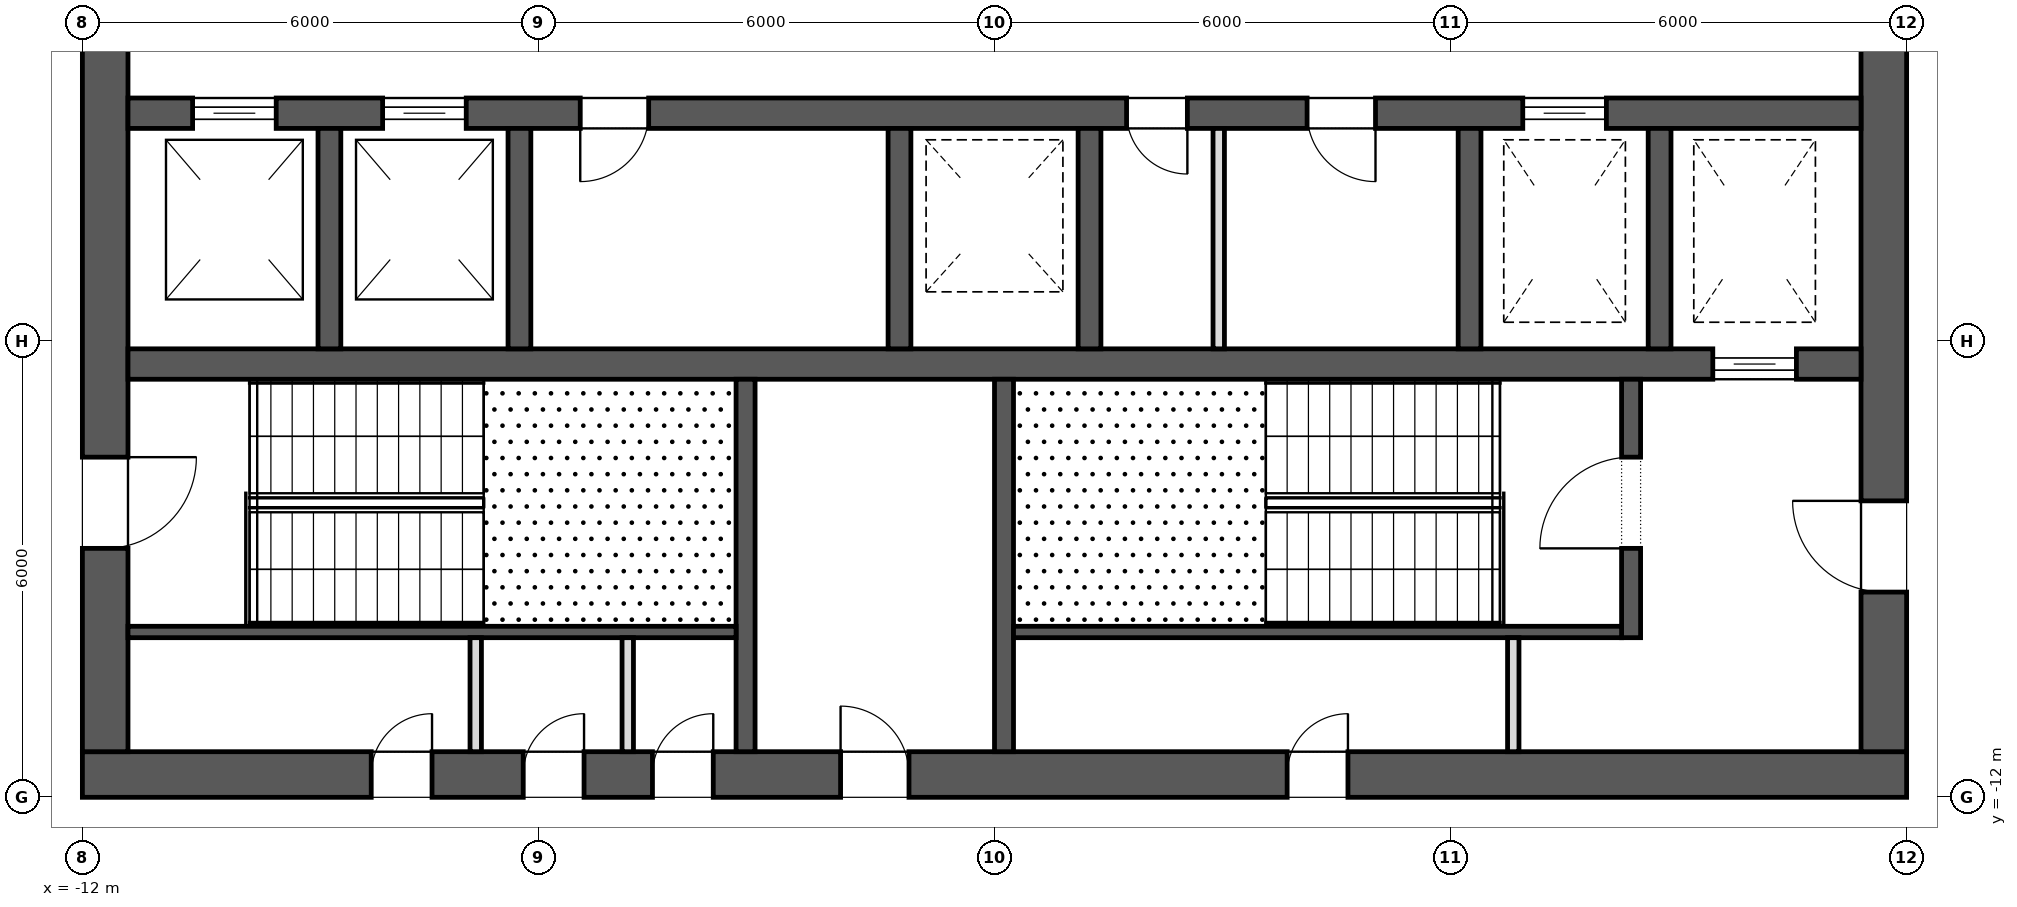
"""IFC4 building model, lengths in metres.
Left out: names, types, materials, properties, quantities, classifications, styles, units other than length and angle.
Written with IfcOpenShell. Run it as: python <this file> out.ifc"""

import sys

from ifc_helpers import new_model, si_unit, direction, frame, frame_2d, origin, place, context, subcontext, project, spatial, rectangle, extrude, element, fill, save


model = new_model("IFC4")
c1 = context("Model", 3, precision=1e-05, world=origin(), true_north=direction((0.0, 1.0)))
c2 = subcontext(c1, "Body", "Model", "MODEL_VIEW")
j1 = project(units=[si_unit("LENGTHUNIT", "METRE"), si_unit("PLANEANGLEUNIT", "RADIAN")], contexts=[c1])
p1 = place(None, origin())
s1 = spatial("IfcSite", under=j1, at=p1, CompositionType="ELEMENT")
p2 = place(p1, origin())
s2 = spatial("IfcBuilding", under=s1, at=p2, CompositionType="ELEMENT")
p3 = place(p2, frame((0.0, 0.0, 264.3)))
s3 = spatial("IfcBuildingStorey", under=s2, at=p3, CompositionType="ELEMENT", Elevation=264.3)
p4 = place(p3, frame((-12.0, -11.7, 0.0), z_axis=(0.0, 0.0, 1.0), x_axis=(1.0, 0.0, 0.0)))
e1 = element("IfcWall", 1, at=p4, inside=s3, PredefinedType="SHEAR", context=c2, shape_type="SweptSolid", body=[
    extrude(rectangle(XDim=24.0, YDim=0.6, at=frame_2d((12.0, 0.0))), origin(), (0.0, 0.0, 1.0), 4.0),
])
p5 = place(p4, frame((9.975, 0.0, 0.0)))
e2 = element("IfcOpeningElement", 2, at=p5, cuts=e1, PredefinedType="OPENING", context=c2, shape_type="SweptSolid", body=[
    extrude(rectangle(XDim=0.9, YDim=2.1, at=frame_2d((0.45, 1.05))), frame((0.0, 0.312, 0.0), z_axis=(0.0, -1.0, 0.0), x_axis=(1.0, 0.0, 0.0)), (0.0, 0.0, 1.0), 0.624),
])
p6 = place(p4, frame((3.8, 0.0, 0.0)))
e3 = element("IfcOpeningElement", 3, at=p6, cuts=e1, PredefinedType="OPENING", context=c2, shape_type="SweptSolid", body=[
    extrude(rectangle(XDim=0.8, YDim=2.1, at=frame_2d((0.4, 1.05))), frame((0.0, 0.312, 0.0), z_axis=(0.0, -1.0, 0.0), x_axis=(1.0, 0.0, 0.0)), (0.0, 0.0, 1.0), 0.624),
])
p7 = place(p4, frame((5.8, 0.0, 0.0)))
e4 = element("IfcOpeningElement", 4, at=p7, cuts=e1, PredefinedType="OPENING", context=c2, shape_type="SweptSolid", body=[
    extrude(rectangle(XDim=0.8, YDim=2.1, at=frame_2d((0.4, 1.05))), frame((0.0, 0.312, 0.0), z_axis=(0.0, -1.0, 0.0), x_axis=(1.0, 0.0, 0.0)), (0.0, 0.0, 1.0), 0.624),
])
p8 = place(p4, frame((7.5, 0.0, 0.0)))
e5 = element("IfcOpeningElement", 5, at=p8, cuts=e1, PredefinedType="OPENING", context=c2, shape_type="SweptSolid", body=[
    extrude(rectangle(XDim=0.8, YDim=2.1, at=frame_2d((0.4, 1.05))), frame((0.0, 0.312, 0.0), z_axis=(0.0, -1.0, 0.0), x_axis=(1.0, 0.0, 0.0)), (0.0, 0.0, 1.0), 0.624),
])
p9 = place(p4, frame((15.85, 0.0, 0.0)))
e6 = element("IfcOpeningElement", 6, at=p9, cuts=e1, PredefinedType="OPENING", context=c2, shape_type="SweptSolid", body=[
    extrude(rectangle(XDim=0.8, YDim=2.1, at=frame_2d((0.4, 1.05))), frame((0.0, 0.312, 0.0), z_axis=(0.0, -1.0, 0.0), x_axis=(1.0, 0.0, 0.0)), (0.0, 0.0, 1.0), 0.624),
])
p10 = place(p3, frame((11.7, -11.4, 0.0), z_axis=(0.0, 0.0, 1.0), x_axis=(0.0, 1.0, 0.0)))
e7 = element("IfcWall", 7, at=p10, inside=s3, PredefinedType="SHEAR", context=c2, shape_type="SweptSolid", body=[
    extrude(rectangle(XDim=22.8, YDim=0.6, at=frame_2d((11.4, 0.0))), origin(), (0.0, 0.0, 1.0), 4.0),
])
p11 = place(p10, frame((10.2, 0.0, 0.0)))
e8 = element("IfcOpeningElement", 8, at=p11, cuts=e7, PredefinedType="OPENING", context=c2, shape_type="SweptSolid", body=[
    extrude(rectangle(XDim=2.4, YDim=2.1, at=frame_2d((1.2, 1.05))), frame((0.0, 0.312, 0.0), z_axis=(0.0, -1.0, 0.0), x_axis=(1.0, 0.0, 0.0)), (0.0, 0.0, 1.0), 0.624),
])
p12 = place(p10, frame((19.5, 0.0, 0.0)))
e9 = element("IfcOpeningElement", 9, at=p12, cuts=e7, PredefinedType="OPENING", context=c2, shape_type="SweptSolid", body=[
    extrude(rectangle(XDim=1.2, YDim=2.1, at=frame_2d((0.6, 1.05))), frame((0.0, 0.312, 0.0), z_axis=(0.0, -1.0, 0.0), x_axis=(1.0, 0.0, 0.0)), (0.0, 0.0, 1.0), 0.624),
])
p13 = place(p10, frame((2.1, 0.0, 0.0)))
e10 = element("IfcOpeningElement", 10, at=p13, cuts=e7, PredefinedType="OPENING", context=c2, shape_type="SweptSolid", body=[
    extrude(rectangle(XDim=1.2, YDim=2.1, at=frame_2d((0.6, 1.05))), frame((0.0, 0.312, 0.0), z_axis=(0.0, -1.0, 0.0), x_axis=(1.0, 0.0, 0.0)), (0.0, 0.0, 1.0), 0.624),
])
p14 = place(p3, frame((-11.7, -11.4, 0.0), z_axis=(0.0, 0.0, 1.0), x_axis=(0.0, 1.0, 0.0)))
e11 = element("IfcWall", 11, at=p14, inside=s3, PredefinedType="SHEAR", context=c2, shape_type="SweptSolid", body=[
    extrude(rectangle(XDim=22.8, YDim=0.6, at=frame_2d((11.4, 0.0))), origin(), (0.0, 0.0, 1.0), 4.0),
])
p15 = place(p14, frame((10.2, 0.0, 0.0)))
e12 = element("IfcOpeningElement", 12, at=p15, cuts=e11, PredefinedType="OPENING", context=c2, shape_type="SweptSolid", body=[
    extrude(rectangle(XDim=2.4, YDim=2.1, at=frame_2d((1.2, 1.05))), frame((0.0, 0.312, 0.0), z_axis=(0.0, -1.0, 0.0), x_axis=(1.0, 0.0, 0.0)), (0.0, 0.0, 1.0), 0.624),
])
p16 = place(p14, frame((18.925, 0.0, 0.0)))
e13 = element("IfcOpeningElement", 13, at=p16, cuts=e11, PredefinedType="OPENING", context=c2, shape_type="SweptSolid", body=[
    extrude(rectangle(XDim=1.2, YDim=2.1, at=frame_2d((0.6, 1.05))), frame((0.0, 0.312, 0.0), z_axis=(0.0, -1.0, 0.0), x_axis=(1.0, 0.0, 0.0)), (0.0, 0.0, 1.0), 0.624),
])
p17 = place(p14, frame((2.675, 0.0, 0.0)))
e14 = element("IfcOpeningElement", 14, at=p17, cuts=e11, PredefinedType="OPENING", context=c2, shape_type="SweptSolid", body=[
    extrude(rectangle(XDim=1.2, YDim=2.1, at=frame_2d((0.6, 1.05))), frame((0.0, 0.312, 0.0), z_axis=(0.0, -1.0, 0.0), x_axis=(1.0, 0.0, 0.0)), (0.0, 0.0, 1.0), 0.624),
])
p18 = place(p3, frame((-11.4, -3.0, 0.0), z_axis=(0.0, 0.0, 1.0), x_axis=(1.0, 0.0, 0.0)))
e15 = element("IfcWall", 15, at=p18, inside=s3, PredefinedType="SHEAR", context=c2, shape_type="SweptSolid", body=[
    extrude(rectangle(XDim=22.8, YDim=0.4, at=frame_2d((11.4, 0.0))), origin(), (0.0, 0.0, 1.0), 4.0),
])
p19 = place(p18, frame((0.85, 0.0, 0.0)))
e16 = element("IfcOpeningElement", 16, at=p19, cuts=e15, PredefinedType="OPENING", context=c2, shape_type="SweptSolid", body=[
    extrude(rectangle(XDim=1.1, YDim=2.1, at=frame_2d((0.55, 1.05))), frame((0.0, 0.212, 0.0), z_axis=(0.0, -1.0, 0.0), x_axis=(1.0, 0.0, 0.0)), (0.0, 0.0, 1.0), 0.424),
])
p20 = place(p18, frame((3.35, 0.0, 0.0)))
e17 = element("IfcOpeningElement", 17, at=p20, cuts=e15, PredefinedType="OPENING", context=c2, shape_type="SweptSolid", body=[
    extrude(rectangle(XDim=1.1, YDim=2.1, at=frame_2d((0.55, 1.05))), frame((0.0, 0.212, 0.0), z_axis=(0.0, -1.0, 0.0), x_axis=(1.0, 0.0, 0.0)), (0.0, 0.0, 1.0), 0.424),
])
p21 = place(p18, frame((18.35, 0.0, 0.0)))
e18 = element("IfcOpeningElement", 18, at=p21, cuts=e15, PredefinedType="OPENING", context=c2, shape_type="SweptSolid", body=[
    extrude(rectangle(XDim=1.1, YDim=2.1, at=frame_2d((0.55, 1.05))), frame((0.0, 0.212, 0.0), z_axis=(0.0, -1.0, 0.0), x_axis=(1.0, 0.0, 0.0)), (0.0, 0.0, 1.0), 0.424),
])
p22 = place(p18, frame((13.137, 0.0, 0.0)))
e19 = element("IfcOpeningElement", 19, at=p22, cuts=e15, PredefinedType="OPENING", context=c2, shape_type="SweptSolid", body=[
    extrude(rectangle(XDim=0.8, YDim=2.1, at=frame_2d((0.4, 1.05))), frame((0.0, 0.212, 0.0), z_axis=(0.0, -1.0, 0.0), x_axis=(1.0, 0.0, 0.0)), (0.0, 0.0, 1.0), 0.424),
])
p23 = place(p18, frame((15.512, 0.0, 0.0)))
e20 = element("IfcOpeningElement", 20, at=p23, cuts=e15, PredefinedType="OPENING", context=c2, shape_type="SweptSolid", body=[
    extrude(rectangle(XDim=0.9, YDim=2.1, at=frame_2d((0.45, 1.05))), frame((0.0, 0.212, 0.0), z_axis=(0.0, -1.0, 0.0), x_axis=(1.0, 0.0, 0.0)), (0.0, 0.0, 1.0), 0.424),
])
p24 = place(p18, frame((5.95, 0.0, 0.0)))
e21 = element("IfcOpeningElement", 21, at=p24, cuts=e15, PredefinedType="OPENING", context=c2, shape_type="SweptSolid", body=[
    extrude(rectangle(XDim=0.9, YDim=2.1, at=frame_2d((0.45, 1.05))), frame((0.0, 0.212, 0.0), z_axis=(0.0, -1.0, 0.0), x_axis=(1.0, 0.0, 0.0)), (0.0, 0.0, 1.0), 0.424),
])
p25 = place(p3, frame((-11.4, -6.3, 0.0), z_axis=(0.0, 0.0, 1.0), x_axis=(1.0, 0.0, 0.0)))
e22 = element("IfcWall", 22, at=p25, inside=s3, PredefinedType="SHEAR", context=c2, shape_type="SweptSolid", body=[
    extrude(rectangle(XDim=22.8, YDim=0.4, at=frame_2d((11.4, 0.0))), origin(), (0.0, 0.0, 1.0), 4.0),
])
p26 = place(p25, frame((20.85, 0.0, 0.0)))
e23 = element("IfcOpeningElement", 23, at=p26, cuts=e22, PredefinedType="OPENING", context=c2, shape_type="SweptSolid", body=[
    extrude(rectangle(XDim=1.1, YDim=2.1, at=frame_2d((0.55, 1.05))), frame((0.0, 0.212, 0.0), z_axis=(0.0, -1.0, 0.0), x_axis=(1.0, 0.0, 0.0)), (0.0, 0.0, 1.0), 0.424),
])
for number, where, z_axis, x_axis in (
    (24, (-8.75, -6.1, 0.0), (0.0, 0.0, 1.0), (0.0, 1.0, 0.0)),
    (25, (-6.25, -6.1, 0.0), (0.0, 0.0, 1.0), (0.0, 1.0, 0.0)),
    (26, (-1.25, -6.1, 0.0), (0.0, 0.0, 1.0), (0.0, 1.0, 0.0)),
    (27, (1.25, -6.1, 0.0), (0.0, 0.0, 1.0), (0.0, 1.0, 0.0)),
    (28, (6.25, -6.1, 0.0), (0.0, 0.0, 1.0), (0.0, 1.0, 0.0)),
    (29, (8.75, -6.1, 0.0), (0.0, 0.0, 1.0), (0.0, 1.0, 0.0)),
):
    element("IfcWall", number, at=place(p3, frame(where, z_axis=z_axis, x_axis=x_axis)), inside=s3, PredefinedType="SHEAR", context=c2, shape_type="SweptSolid", body=[
        extrude(rectangle(XDim=2.9, YDim=0.3, at=frame_2d((1.45, 0.0))), origin(), (0.0, 0.0, 1.0), 4.0),
    ])
for number, where, z_axis, x_axis in (
    (30, (-3.275, -11.4, 0.0), (0.0, 0.0, 1.0), (0.0, 1.0, 0.0)),
    (31, (0.125, -11.4, 0.0), (0.0, 0.0, 1.0), (0.0, 1.0, 0.0)),
):
    element("IfcWall", number, at=place(p3, frame(where, z_axis=z_axis, x_axis=x_axis)), inside=s3, PredefinedType="SHEAR", context=c2, shape_type="SweptSolid", body=[
        extrude(rectangle(XDim=4.9, YDim=0.25, at=frame_2d((2.45, 0.0))), origin(), (0.0, 0.0, 1.0), 3.7),
    ])
p27 = place(p3, frame((8.375, -9.9, 0.0), z_axis=(0.0, 0.0, 1.0), x_axis=(0.0, 1.0, 0.0)))
e32 = element("IfcWall", 32, at=p27, inside=s3, PredefinedType="SHEAR", context=c2, shape_type="SweptSolid", body=[
    extrude(rectangle(XDim=3.4, YDim=0.25, at=frame_2d((1.7, 0.0))), origin(), (0.0, 0.0, 1.0), 3.7),
])
p28 = place(p27, frame((1.175, 0.0, 0.0)))
e33 = element("IfcOpeningElement", 33, at=p28, cuts=e32, PredefinedType="OPENING", context=c2, shape_type="SweptSolid", body=[
    extrude(rectangle(XDim=1.2, YDim=2.1, at=frame_2d((0.6, 1.05))), frame((0.0, 0.137, 0.0), z_axis=(0.0, -1.0, 0.0), x_axis=(1.0, 0.0, 0.0)), (0.0, 0.0, 1.0), 0.274),
])
for number, where, z_axis, x_axis in (
    (34, (-11.4, -9.825, 0.0), (0.0, 0.0, 1.0), (1.0, 0.0, 0.0)),
    (35, (0.25, -9.825, 0.0), (0.0, 0.0, 1.0), (1.0, 0.0, 0.0)),
):
    element("IfcWall", number, at=place(p3, frame(where, z_axis=z_axis, x_axis=x_axis)), inside=s3, PredefinedType="SHEAR", context=c2, shape_type="SweptSolid", body=[
        extrude(rectangle(XDim=8.0, YDim=0.15, at=frame_2d((4.0, 0.0))), origin(), (0.0, 0.0, 1.0), 3.7),
    ])
for number, where, z_axis, x_axis in (
    (36, (-6.825, -11.4, 0.0), (0.0, 0.0, 1.0), (0.0, 1.0, 0.0)),
    (37, (-4.825, -11.4, 0.0), (0.0, 0.0, 1.0), (0.0, 1.0, 0.0)),
    (38, (6.825, -11.4, 0.0), (0.0, 0.0, 1.0), (0.0, 1.0, 0.0)),
):
    element("IfcWall", number, at=place(p3, frame(where, z_axis=z_axis, x_axis=x_axis)), inside=s3, PredefinedType="PARTITIONING", context=c2, shape_type="SweptSolid", body=[
        extrude(rectangle(XDim=1.5, YDim=0.15, at=frame_2d((0.75, 0.0))), origin(), (0.0, 0.0, 1.0), 3.7),
    ])
p29 = place(p3, frame((2.95, -6.1, 0.0), z_axis=(0.0, 0.0, 1.0), x_axis=(0.0, 1.0, 0.0)))
e39 = element("IfcWall", 39, at=p29, inside=s3, PredefinedType="PARTITIONING", context=c2, shape_type="SweptSolid", body=[
    extrude(rectangle(XDim=2.9, YDim=0.15, at=frame_2d((1.45, 0.0))), origin(), (0.0, 0.0, 1.0), 3.7),
])
p30 = place(p26, origin())
e40 = element("IfcDoor", 40, at=p30, inside=s3, OperationType="SLIDING_TO_LEFT", PredefinedType="DOOR", context=c2, shape_type="SweptSolid", body=[
    extrude(rectangle(XDim=1.1, YDim=2.1, at=frame_2d((0.55, 1.05))), frame((0.0, 0.025, 0.0), z_axis=(0.0, -1.0, 0.0), x_axis=(1.0, 0.0, 0.0)), (0.0, 0.0, 1.0), 0.05),
])
fill(e23, e40)
p31 = place(p19, origin())
e41 = element("IfcDoor", 41, at=p31, inside=s3, OperationType="SLIDING_TO_LEFT", PredefinedType="DOOR", context=c2, shape_type="SweptSolid", body=[
    extrude(rectangle(XDim=1.1, YDim=2.1, at=frame_2d((0.55, 1.05))), frame((0.0, 0.025, 0.0), z_axis=(0.0, -1.0, 0.0), x_axis=(1.0, 0.0, 0.0)), (0.0, 0.0, 1.0), 0.05),
])
fill(e16, e41)
p32 = place(p20, origin())
e42 = element("IfcDoor", 42, at=p32, inside=s3, OperationType="SLIDING_TO_LEFT", PredefinedType="DOOR", context=c2, shape_type="SweptSolid", body=[
    extrude(rectangle(XDim=1.1, YDim=2.1, at=frame_2d((0.55, 1.05))), frame((0.0, 0.025, 0.0), z_axis=(0.0, -1.0, 0.0), x_axis=(1.0, 0.0, 0.0)), (0.0, 0.0, 1.0), 0.05),
])
fill(e17, e42)
p33 = place(p21, origin())
e43 = element("IfcDoor", 43, at=p33, inside=s3, OperationType="SLIDING_TO_LEFT", PredefinedType="DOOR", context=c2, shape_type="SweptSolid", body=[
    extrude(rectangle(XDim=1.1, YDim=2.1, at=frame_2d((0.55, 1.05))), frame((0.0, 0.025, 0.0), z_axis=(0.0, -1.0, 0.0), x_axis=(1.0, 0.0, 0.0)), (0.0, 0.0, 1.0), 0.05),
])
fill(e18, e43)
p34 = place(p17, frame((1.2, 0.0, 0.0), z_axis=(0.0, 0.0, 1.0), x_axis=(-1.0, 0.0, 0.0)))
e44 = element("IfcDoor", 44, at=p34, inside=s3, OperationType="SINGLE_SWING_RIGHT", PredefinedType="DOOR", context=c2, shape_type="SweptSolid", body=[
    extrude(rectangle(XDim=1.2, YDim=2.1, at=frame_2d((0.6, 1.05))), frame((0.0, 0.025, 0.0), z_axis=(0.0, -1.0, 0.0), x_axis=(1.0, 0.0, 0.0)), (0.0, 0.0, 1.0), 0.05),
])
fill(e14, e44)
p35 = place(p28, origin())
e45 = element("IfcDoor", 45, at=p35, inside=s3, OperationType="SINGLE_SWING_RIGHT", PredefinedType="DOOR", context=c2, shape_type="SweptSolid", body=[
    extrude(rectangle(XDim=1.2, YDim=2.1, at=frame_2d((0.6, 1.05))), frame((0.0, 0.025, 0.0), z_axis=(0.0, -1.0, 0.0), x_axis=(1.0, 0.0, 0.0)), (0.0, 0.0, 1.0), 0.05),
])
fill(e33, e45)
p36 = place(p13, origin())
e46 = element("IfcDoor", 46, at=p36, inside=s3, OperationType="SINGLE_SWING_LEFT", PredefinedType="DOOR", context=c2, shape_type="SweptSolid", body=[
    extrude(rectangle(XDim=1.2, YDim=2.1, at=frame_2d((0.6, 1.05))), frame((0.0, 0.025, 0.0), z_axis=(0.0, -1.0, 0.0), x_axis=(1.0, 0.0, 0.0)), (0.0, 0.0, 1.0), 0.05),
])
fill(e10, e46)
p37 = place(p5, origin())
e47 = element("IfcDoor", 47, at=p37, inside=s3, OperationType="SINGLE_SWING_RIGHT", PredefinedType="DOOR", context=c2, shape_type="SweptSolid", body=[
    extrude(rectangle(XDim=0.9, YDim=2.1, at=frame_2d((0.45, 1.05))), frame((0.0, 0.025, 0.0), z_axis=(0.0, -1.0, 0.0), x_axis=(1.0, 0.0, 0.0)), (0.0, 0.0, 1.0), 0.05),
])
fill(e2, e47)
p38 = place(p6, origin())
e48 = element("IfcDoor", 48, at=p38, inside=s3, OperationType="SINGLE_SWING_LEFT", PredefinedType="DOOR", context=c2, shape_type="SweptSolid", body=[
    extrude(rectangle(XDim=0.8, YDim=2.1, at=frame_2d((0.4, 1.05))), frame((0.0, 0.025, 0.0), z_axis=(0.0, -1.0, 0.0), x_axis=(1.0, 0.0, 0.0)), (0.0, 0.0, 1.0), 0.05),
])
fill(e3, e48)
p39 = place(p7, origin())
e49 = element("IfcDoor", 49, at=p39, inside=s3, OperationType="SINGLE_SWING_LEFT", PredefinedType="DOOR", context=c2, shape_type="SweptSolid", body=[
    extrude(rectangle(XDim=0.8, YDim=2.1, at=frame_2d((0.4, 1.05))), frame((0.0, 0.025, 0.0), z_axis=(0.0, -1.0, 0.0), x_axis=(1.0, 0.0, 0.0)), (0.0, 0.0, 1.0), 0.05),
])
fill(e4, e49)
p40 = place(p8, origin())
e50 = element("IfcDoor", 50, at=p40, inside=s3, OperationType="SINGLE_SWING_LEFT", PredefinedType="DOOR", context=c2, shape_type="SweptSolid", body=[
    extrude(rectangle(XDim=0.8, YDim=2.1, at=frame_2d((0.4, 1.05))), frame((0.0, 0.025, 0.0), z_axis=(0.0, -1.0, 0.0), x_axis=(1.0, 0.0, 0.0)), (0.0, 0.0, 1.0), 0.05),
])
fill(e5, e50)
p41 = place(p9, origin())
e51 = element("IfcDoor", 51, at=p41, inside=s3, OperationType="SINGLE_SWING_LEFT", PredefinedType="DOOR", context=c2, shape_type="SweptSolid", body=[
    extrude(rectangle(XDim=0.8, YDim=2.1, at=frame_2d((0.4, 1.05))), frame((0.0, 0.025, 0.0), z_axis=(0.0, -1.0, 0.0), x_axis=(1.0, 0.0, 0.0)), (0.0, 0.0, 1.0), 0.05),
])
fill(e6, e51)
p42 = place(p22, frame((0.8, 0.0, 0.0), z_axis=(0.0, 0.0, 1.0), x_axis=(-1.0, 0.0, 0.0)))
e52 = element("IfcDoor", 52, at=p42, inside=s3, OperationType="SINGLE_SWING_RIGHT", PredefinedType="DOOR", context=c2, shape_type="SweptSolid", body=[
    extrude(rectangle(XDim=0.8, YDim=2.1, at=frame_2d((0.4, 1.05))), frame((0.0, 0.025, 0.0), z_axis=(0.0, -1.0, 0.0), x_axis=(1.0, 0.0, 0.0)), (0.0, 0.0, 1.0), 0.05),
])
fill(e19, e52)
p43 = place(p23, frame((0.9, 0.0, 0.0), z_axis=(0.0, 0.0, 1.0), x_axis=(-1.0, 0.0, 0.0)))
e53 = element("IfcDoor", 53, at=p43, inside=s3, OperationType="SINGLE_SWING_RIGHT", PredefinedType="DOOR", context=c2, shape_type="SweptSolid", body=[
    extrude(rectangle(XDim=0.9, YDim=2.1, at=frame_2d((0.45, 1.05))), frame((0.0, 0.025, 0.0), z_axis=(0.0, -1.0, 0.0), x_axis=(1.0, 0.0, 0.0)), (0.0, 0.0, 1.0), 0.05),
])
fill(e20, e53)
p44 = place(p24, frame((0.9, 0.0, 0.0), z_axis=(0.0, 0.0, 1.0), x_axis=(-1.0, 0.0, 0.0)))
e54 = element("IfcDoor", 54, at=p44, inside=s3, OperationType="SINGLE_SWING_LEFT", PredefinedType="DOOR", context=c2, shape_type="SweptSolid", body=[
    extrude(rectangle(XDim=0.9, YDim=2.1, at=frame_2d((0.45, 1.05))), frame((0.0, 0.025, 0.0), z_axis=(0.0, -1.0, 0.0), x_axis=(1.0, 0.0, 0.0)), (0.0, 0.0, 1.0), 0.05),
])
fill(e21, e54)
save(model, sys.argv[1])
